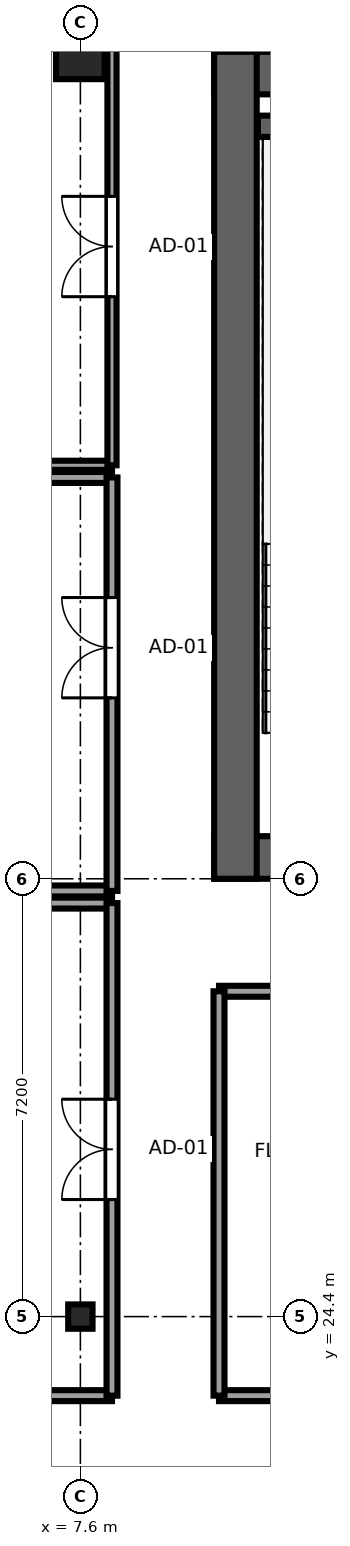
"""IFC4 building model, lengths in metres.
Left out: names, types, materials, properties, quantities, classifications, styles, units other than length and angle.
Written with IfcOpenShell. Run it as: python <this file> out.ifc"""

import sys

from ifc_helpers import new_model, si_unit, direction, frame, frame_2d, origin, origin_2d, place, context, subcontext, project, spatial, rectangle, i_section, extrude, source, transform, mapped, element, fill, save


model = new_model("IFC4")
c1 = context("Model", 3, precision=1e-05, world=origin(), true_north=direction((0.0, 1.0)))
c2 = subcontext(c1, "Body", "Model", "MODEL_VIEW")
j1 = project(units=[si_unit("LENGTHUNIT", "METRE"), si_unit("PLANEANGLEUNIT", "RADIAN")], contexts=[c1])
p1 = place(None, origin())
s1 = spatial("IfcSite", under=j1, at=p1, CompositionType="ELEMENT")
p2 = place(p1, origin())
s2 = spatial("IfcBuilding", under=s1, at=p2, CompositionType="ELEMENT")
p3 = place(p2, frame((0.0, 0.0, 171.9)))
s3 = spatial("IfcBuildingStorey", under=s2, at=p3, CompositionType="ELEMENT", Elevation=171.9)
p4 = place(p3, frame((9.8, 31.95, 0.0), z_axis=(0.0, 0.0, 1.0), x_axis=(1.0, 0.0, 0.0)))
e1 = element("IfcWall", 1, at=p4, inside=s3, PredefinedType="SHEAR", context=c2, shape_type="SweptSolid", body=[
    extrude(rectangle(XDim=26.4, YDim=0.7, at=frame_2d((13.2, 0.0))), origin(), (0.0, 0.0, 1.0), 3.55),
])
p5 = place(p4, frame((7.65, 0.0, 0.0), z_axis=(0.0, 0.0, 1.0), x_axis=(-1.0, 0.0, 0.0)))
e2 = element("IfcOpeningElement", 2, at=p5, cuts=e1, PredefinedType="OPENING", context=c2, shape_type="SweptSolid", body=[
    extrude(rectangle(XDim=1.5, YDim=2.04, at=frame_2d((0.75, 1.02))), frame((0.0, 0.36, 0.0), z_axis=(0.0, -1.0, 0.0), x_axis=(1.0, 0.0, 0.0)), (0.0, 0.0, 1.0), 0.72),
])
p6 = place(p4, frame((13.95, 0.0, 0.0), z_axis=(0.0, 0.0, 1.0), x_axis=(-1.0, 0.0, 0.0)))
e3 = element("IfcOpeningElement", 3, at=p6, cuts=e1, PredefinedType="OPENING", context=c2, shape_type="SweptSolid", body=[
    extrude(rectangle(XDim=1.5, YDim=2.04, at=frame_2d((0.75, 1.02))), frame((0.0, 0.36, 0.0), z_axis=(0.0, -1.0, 0.0), x_axis=(1.0, 0.0, 0.0)), (0.0, 0.0, 1.0), 0.72),
])
p7 = place(p4, frame((20.25, 0.0, 0.0), z_axis=(0.0, 0.0, 1.0), x_axis=(-1.0, 0.0, 0.0)))
e4 = element("IfcOpeningElement", 4, at=p7, cuts=e1, PredefinedType="OPENING", context=c2, shape_type="SweptSolid", body=[
    extrude(rectangle(XDim=1.5, YDim=2.04, at=frame_2d((0.75, 1.02))), frame((0.0, 0.36, 0.0), z_axis=(0.0, -1.0, 0.0), x_axis=(1.0, 0.0, 0.0)), (0.0, 0.0, 1.0), 0.72),
])
p8 = place(p3, frame((9.8, 44.85, 0.0), z_axis=(0.0, 0.0, 1.0), x_axis=(1.0, 0.0, 0.0)))
e5 = element("IfcWall", 5, at=p8, inside=s3, PredefinedType="SHEAR", context=c2, shape_type="SweptSolid", body=[
    extrude(rectangle(XDim=26.4, YDim=0.7, at=frame_2d((13.2, 0.0))), origin(), (0.0, 0.0, 1.0), 3.55),
])
p9 = place(p3, frame((10.15, 31.6, 0.0), z_axis=(0.0, 0.0, 1.0), x_axis=(0.0, 1.0, 0.0)))
e6 = element("IfcWall", 6, at=p9, inside=s3, PredefinedType="SHEAR", context=c2, shape_type="SweptSolid", body=[
    extrude(rectangle(XDim=13.6, YDim=0.7, at=frame_2d((6.8, 0.0))), origin(), (0.0, 0.0, 1.0), 3.55),
])
p10 = place(p3, frame((10.52, 43.975, 0.0), z_axis=(0.0, 0.0, 1.0), x_axis=(1.0, 0.0, 0.0)))
e7 = element("IfcWall", 7, at=p10, inside=s3, PredefinedType="SHEAR", context=c2, shape_type="SweptSolid", body=[
    extrude(rectangle(XDim=3.6, YDim=0.35, at=frame_2d((1.8, 0.0))), origin(), (0.0, 0.0, 1.0), 3.55),
])
m1 = source(origin(), c2, "Body", "SweptSolid", [
    extrude(i_section(OverallWidth=0.4, OverallDepth=0.4, WebThickness=0.02, FlangeThickness=0.035, at=origin_2d()), origin(), (0.0, 0.0, 1.0), 3.55),
])
p11 = place(p3, frame((7.6, 24.4, 0.0), z_axis=(0.0, 0.0, 1.0), x_axis=(1.0, 0.0, 0.0)))
e8 = element("IfcColumn", 8, at=p11, inside=s3, PredefinedType="COLUMN", context=c2, shape_type="MappedRepresentation", body=[
    mapped(m1, transform((0.0, 0.0, 0.0), x_axis=(1.0, 0.0, 0.0), y_axis=(0.0, 1.0, 0.0), z_axis=(0.0, 0.0, 1.0), scale=1.0)),
])
m2 = source(origin(), c2, "Body", "SweptSolid", [
    extrude(rectangle(XDim=0.8, YDim=0.8, at=origin_2d()), origin(), (0.0, 0.0, 1.0), 3.55),
])
p12 = place(p3, frame((7.6, 45.15, 0.0), z_axis=(0.0, 0.0, 1.0), x_axis=(1.0, 0.0, 0.0)))
e9 = element("IfcColumn", 9, at=p12, inside=s3, PredefinedType="COLUMN", context=c2, shape_type="MappedRepresentation", body=[
    mapped(m2, transform((0.0, 0.0, 0.0), x_axis=(1.0, 0.0, 0.0), y_axis=(0.0, 1.0, 0.0), z_axis=(0.0, 0.0, 1.0), scale=1.0)),
])
for number, where, z_axis, x_axis in (
    (10, (3.005, 23.1, 0.0), (0.0, 0.0, 1.0), (1.0, 0.0, 0.0)),
    (11, (3.005, 31.2, 0.0), (0.0, 0.0, 1.0), (1.0, 0.0, 0.0)),
):
    element("IfcWall", number, at=place(p3, frame(where, z_axis=z_axis, x_axis=x_axis)), inside=s3, PredefinedType="PARTITIONING", context=c2, shape_type="SweptSolid", body=[
        extrude(rectangle(XDim=5.115, YDim=0.18, at=frame_2d((2.558, 0.0))), origin(), (0.0, 0.0, 1.0), 3.37),
    ])
p13 = place(p3, frame((8.12, 23.1, 0.0), z_axis=(0.0, 0.0, 1.0), x_axis=(0.0, 1.0, 0.0)))
e12 = element("IfcWall", 12, at=p13, inside=s3, PredefinedType="PARTITIONING", context=c2, shape_type="SweptSolid", body=[
    extrude(rectangle(XDim=8.1, YDim=0.18, at=frame_2d((4.05, 0.0))), origin(), (0.0, 0.0, 1.0), 3.37),
])
p14 = place(p13, frame((3.225, 0.0, 0.0)))
e13 = element("IfcOpeningElement", 13, at=p14, cuts=e12, PredefinedType="OPENING", context=c2, shape_type="SweptSolid", body=[
    extrude(rectangle(XDim=1.65, YDim=2.15, at=frame_2d((0.825, 1.075))), frame((0.0, 0.1, 0.0), z_axis=(0.0, -1.0, 0.0), x_axis=(1.0, 0.0, 0.0)), (0.0, 0.0, 1.0), 0.2),
])
for number, where, z_axis, x_axis in (
    (14, (3.005, 31.4, 0.0), (0.0, 0.0, 1.0), (1.0, 0.0, 0.0)),
    (15, (3.005, 38.2, 0.0), (0.0, 0.0, 1.0), (1.0, 0.0, 0.0)),
):
    element("IfcWall", number, at=place(p3, frame(where, z_axis=z_axis, x_axis=x_axis)), inside=s3, PredefinedType="PARTITIONING", context=c2, shape_type="SweptSolid", body=[
        extrude(rectangle(XDim=5.115, YDim=0.18, at=frame_2d((2.558, 0.0))), origin(), (0.0, 0.0, 1.0), 3.37),
    ])
p15 = place(p3, frame((8.12, 31.4, 0.0), z_axis=(0.0, 0.0, 1.0), x_axis=(0.0, 1.0, 0.0)))
e16 = element("IfcWall", 16, at=p15, inside=s3, PredefinedType="PARTITIONING", context=c2, shape_type="SweptSolid", body=[
    extrude(rectangle(XDim=6.8, YDim=0.18, at=frame_2d((3.4, 0.0))), origin(), (0.0, 0.0, 1.0), 3.37),
])
p16 = place(p15, frame((3.175, 0.0, 0.0)))
e17 = element("IfcOpeningElement", 17, at=p16, cuts=e16, PredefinedType="OPENING", context=c2, shape_type="SweptSolid", body=[
    extrude(rectangle(XDim=1.65, YDim=2.15, at=frame_2d((0.825, 1.075))), frame((0.0, 0.1, 0.0), z_axis=(0.0, -1.0, 0.0), x_axis=(1.0, 0.0, 0.0)), (0.0, 0.0, 1.0), 0.2),
])
p17 = place(p3, frame((3.005, 38.4, 0.0), z_axis=(0.0, 0.0, 1.0), x_axis=(1.0, 0.0, 0.0)))
e18 = element("IfcWall", 18, at=p17, inside=s3, PredefinedType="PARTITIONING", context=c2, shape_type="SweptSolid", body=[
    extrude(rectangle(XDim=5.115, YDim=0.15, at=frame_2d((2.558, 0.0))), origin(), (0.0, 0.0, 1.0), 3.37),
])
p18 = place(p3, frame((8.12, 38.4, 0.0), z_axis=(0.0, 0.0, 1.0), x_axis=(0.0, 1.0, 0.0)))
e19 = element("IfcWall", 19, at=p18, inside=s3, PredefinedType="PARTITIONING", context=c2, shape_type="SweptSolid", body=[
    extrude(rectangle(XDim=7.195, YDim=0.15, at=frame_2d((3.598, 0.0))), origin(), (0.0, 0.0, 1.0), 3.37),
])
p19 = place(p18, frame((2.772, 0.0, 0.0)))
e20 = element("IfcOpeningElement", 20, at=p19, cuts=e19, PredefinedType="OPENING", context=c2, shape_type="SweptSolid", body=[
    extrude(rectangle(XDim=1.65, YDim=2.15, at=frame_2d((0.825, 1.075))), frame((0.0, 0.085, 0.0), z_axis=(0.0, -1.0, 0.0), x_axis=(1.0, 0.0, 0.0)), (0.0, 0.0, 1.0), 0.17),
])
p20 = place(p3, frame((9.88, 23.1, 0.0), z_axis=(0.0, 0.0, 1.0), x_axis=(1.0, 0.0, 0.0)))
e21 = element("IfcWall", 21, at=p20, inside=s3, PredefinedType="PARTITIONING", context=c2, shape_type="SweptSolid", body=[
    extrude(rectangle(XDim=4.22, YDim=0.18, at=frame_2d((2.11, 0.0))), origin(), (0.0, 0.0, 1.0), 3.37),
])
p21 = place(p20, frame((1.285, 0.0, 0.0)))
e22 = element("IfcOpeningElement", 22, at=p21, cuts=e21, PredefinedType="OPENING", context=c2, shape_type="SweptSolid", body=[
    extrude(rectangle(XDim=1.65, YDim=2.15, at=frame_2d((0.825, 1.075))), frame((0.0, 0.1, 0.0), z_axis=(0.0, -1.0, 0.0), x_axis=(1.0, 0.0, 0.0)), (0.0, 0.0, 1.0), 0.2),
])
p22 = place(p3, frame((9.88, 29.75, 0.0), z_axis=(0.0, 0.0, 1.0), x_axis=(1.0, 0.0, 0.0)))
e23 = element("IfcWall", 23, at=p22, inside=s3, PredefinedType="PARTITIONING", context=c2, shape_type="SweptSolid", body=[
    extrude(rectangle(XDim=4.22, YDim=0.18, at=frame_2d((2.11, 0.0))), origin(), (0.0, 0.0, 1.0), 3.37),
])
p23 = place(p3, frame((9.88, 23.1, 0.0), z_axis=(0.0, 0.0, 1.0), x_axis=(0.0, 1.0, 0.0)))
e24 = element("IfcWall", 24, at=p23, inside=s3, PredefinedType="PARTITIONING", context=c2, shape_type="SweptSolid", body=[
    extrude(rectangle(XDim=6.65, YDim=0.18, at=frame_2d((3.325, 0.0))), origin(), (0.0, 0.0, 1.0), 3.37),
])
m3 = source(origin(), c2, "Body", "SweptSolid", [
    extrude(rectangle(XDim=1.65, YDim=2.15, at=frame_2d((0.825, 1.075))), frame((0.0, 0.025, 0.0), z_axis=(0.0, -1.0, 0.0), x_axis=(1.0, 0.0, 0.0)), (0.0, 0.0, 1.0), 0.05),
])
p24 = place(p14, origin())
e25 = element("IfcDoor", 25, at=p24, inside=s3, OperationType="DOUBLE_DOOR_SINGLE_SWING", PredefinedType="DOOR", context=c2, shape_type="MappedRepresentation", body=[
    mapped(m3, transform((0.0, 0.0, 0.0), x_axis=(1.0, 0.0, 0.0), y_axis=(0.0, 1.0, 0.0), z_axis=(0.0, 0.0, 1.0), scale=1.0)),
])
fill(e13, e25)
p25 = place(p16, origin())
e26 = element("IfcDoor", 26, at=p25, inside=s3, OperationType="DOUBLE_DOOR_SINGLE_SWING", PredefinedType="DOOR", context=c2, shape_type="MappedRepresentation", body=[
    mapped(m3, transform((0.0, 0.0, 0.0), x_axis=(1.0, 0.0, 0.0), y_axis=(0.0, 1.0, 0.0), z_axis=(0.0, 0.0, 1.0), scale=1.0)),
])
fill(e17, e26)
p26 = place(p19, origin())
e27 = element("IfcDoor", 27, at=p26, inside=s3, OperationType="DOUBLE_DOOR_SINGLE_SWING", PredefinedType="DOOR", context=c2, shape_type="MappedRepresentation", body=[
    mapped(m3, transform((0.0, 0.0, 0.0), x_axis=(1.0, 0.0, 0.0), y_axis=(0.0, 1.0, 0.0), z_axis=(0.0, 0.0, 1.0), scale=1.0)),
])
fill(e20, e27)
save(model, sys.argv[1])
